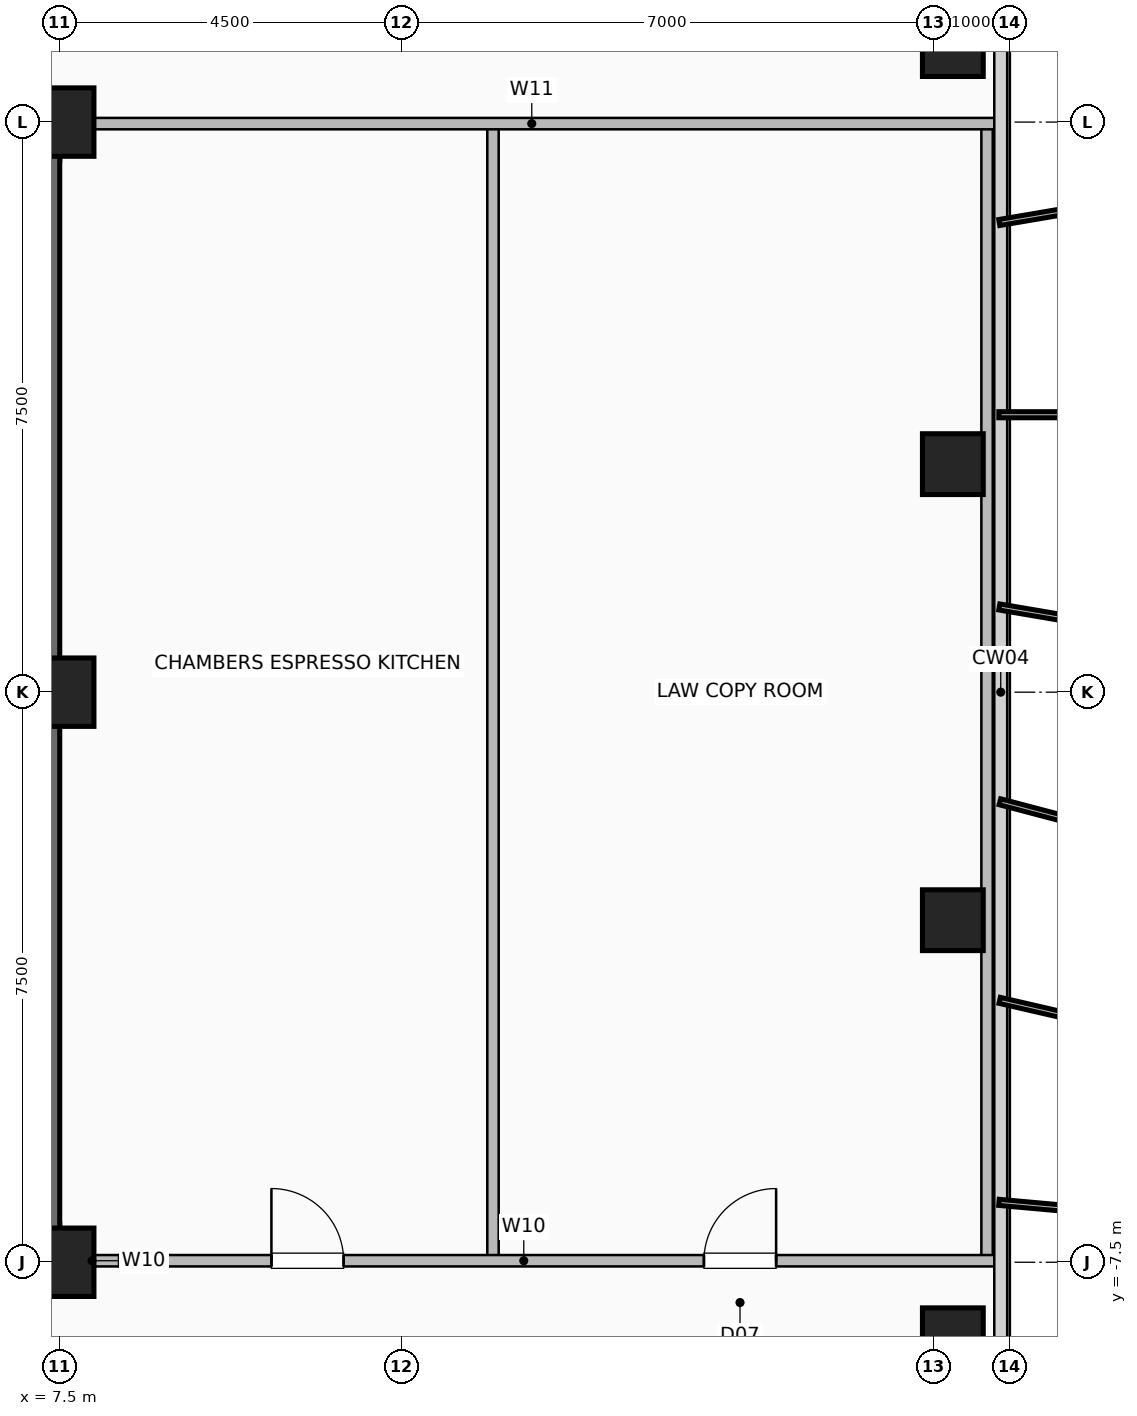
"""IFC4 building model, lengths in metres.
Left out: names, types, materials, properties, quantities, classifications, styles, units other than length and angle.
Written with IfcOpenShell. Run it as: python <this file> out.ifc"""

import sys

from ifc_helpers import new_model, si_unit, direction, frame, frame_2d, origin, origin_2d, place, context, subcontext, project, spatial, rectangle, hollow_rectangle, extrude, element, fill, save


model = new_model("IFC4")
c1 = context("Model", 3, precision=1e-05, world=origin(), true_north=direction((0.0, 1.0)))
c2 = subcontext(c1, "Body", "Model", "MODEL_VIEW")
j1 = project(units=[si_unit("LENGTHUNIT", "METRE"), si_unit("PLANEANGLEUNIT", "RADIAN")], contexts=[c1])
p1 = place(None, origin())
s1 = spatial("IfcSite", under=j1, at=p1, CompositionType="ELEMENT")
p2 = place(p1, origin())
s2 = spatial("IfcBuilding", under=s1, at=p2, CompositionType="ELEMENT")
p3 = place(p2, frame((0.0, 0.0, 173.4)))
s3 = spatial("IfcBuildingStorey", under=s2, at=p3, CompositionType="ELEMENT", Elevation=173.4)
for number, where, z_axis, x_axis in (
    (1, (7.5, -7.5, 0.0), (0.0, 0.0, 1.0), (1.0, 0.0, 0.0)),
    (2, (7.5, 0.0, 0.0), (0.0, 0.0, 1.0), (1.0, 0.0, 0.0)),
    (3, (7.5, 7.5, 0.0), (0.0, 0.0, 1.0), (1.0, 0.0, 0.0)),
):
    element("IfcColumn", number, at=place(p3, frame(where, z_axis=z_axis, x_axis=x_axis)), inside=s3, PredefinedType="COLUMN", context=c2, shape_type="SweptSolid", body=[
        extrude(hollow_rectangle(XDim=0.9, YDim=0.9, WallThickness=0.045, at=origin_2d()), origin(), (0.0, 0.0, 1.0), 3.6),
    ])
for number, where, z_axis, x_axis in (
    (4, (19.25, -8.5, 0.0), (0.0, 0.0, 1.0), (1.0, 0.0, 0.0)),
    (5, (19.25, -3.0, 0.0), (0.0, 0.0, 1.0), (1.0, 0.0, 0.0)),
    (6, (19.25, 3.0, 0.0), (0.0, 0.0, 1.0), (1.0, 0.0, 0.0)),
    (7, (19.25, 8.5, 0.0), (0.0, 0.0, 1.0), (1.0, 0.0, 0.0)),
):
    element("IfcColumn", number, at=place(p3, frame(where, z_axis=z_axis, x_axis=x_axis)), inside=s3, PredefinedType="COLUMN", context=c2, shape_type="SweptSolid", body=[
        extrude(hollow_rectangle(XDim=0.8, YDim=0.8, WallThickness=0.04, at=origin_2d()), origin(), (0.0, 0.0, 1.0), 3.6),
    ])
p4 = place(p3, frame((-7.5, -7.25, 0.0), z_axis=(0.0, 0.0, 1.0), x_axis=(1.0, 0.0, 0.0)))
e8 = element("IfcWall", 8, at=p4, inside=s3, PredefinedType="SHEAR", context=c2, shape_type="SweptSolid", body=[
    extrude(rectangle(XDim=15.0, YDim=0.5, at=frame_2d((7.5, 0.0))), origin(), (0.0, 0.0, 1.0), 3.36),
])
p5 = place(p4, frame((1.55, 0.0, 0.0)))
e9 = element("IfcOpeningElement", 9, at=p5, cuts=e8, PredefinedType="OPENING", context=c2, shape_type="SweptSolid", body=[
    extrude(rectangle(XDim=1.05, YDim=2.08, at=frame_2d((0.525, 1.04))), frame((0.0, 0.26, 0.0), z_axis=(0.0, -1.0, 0.0), x_axis=(1.0, 0.0, 0.0)), (0.0, 0.0, 1.0), 0.52),
])
p6 = place(p4, frame((12.4, 0.0, 0.0)))
e10 = element("IfcOpeningElement", 10, at=p6, cuts=e8, PredefinedType="OPENING", context=c2, shape_type="SweptSolid", body=[
    extrude(rectangle(XDim=1.05, YDim=2.08, at=frame_2d((0.525, 1.04))), frame((0.0, 0.26, 0.0), z_axis=(0.0, -1.0, 0.0), x_axis=(1.0, 0.0, 0.0)), (0.0, 0.0, 1.0), 0.52),
])
p7 = place(p4, frame((5.2, 0.0, 0.0)))
e11 = element("IfcOpeningElement", 11, at=p7, cuts=e8, PredefinedType="OPENING", context=c2, shape_type="SweptSolid", body=[
    extrude(rectangle(XDim=1.0, YDim=2.08, at=frame_2d((0.5, 1.04))), frame((0.0, 0.26, 0.0), z_axis=(0.0, -1.0, 0.0), x_axis=(1.0, 0.0, 0.0)), (0.0, 0.0, 1.0), 0.52),
])
p8 = place(p4, frame((8.65, 0.0, 0.0)))
e12 = element("IfcOpeningElement", 12, at=p8, cuts=e8, PredefinedType="OPENING", context=c2, shape_type="SweptSolid", body=[
    extrude(rectangle(XDim=1.0, YDim=2.08, at=frame_2d((0.5, 1.04))), frame((0.0, 0.26, 0.0), z_axis=(0.0, -1.0, 0.0), x_axis=(1.0, 0.0, 0.0)), (0.0, 0.0, 1.0), 0.52),
])
for number, where, z_axis, x_axis in (
    (13, (-7.5, 7.25, 0.0), (0.0, 0.0, 1.0), (1.0, 0.0, 0.0)),
    (14, (7.25, -7.5, 0.0), (0.0, 0.0, 1.0), (0.0, 1.0, 0.0)),
):
    element("IfcWall", number, at=place(p3, frame(where, z_axis=z_axis, x_axis=x_axis)), inside=s3, PredefinedType="SHEAR", context=c2, shape_type="SweptSolid", body=[
        extrude(rectangle(XDim=15.0, YDim=0.5, at=frame_2d((7.5, 0.0))), origin(), (0.0, 0.0, 1.0), 3.36),
    ])
p9 = place(p3, frame((7.45, -7.48, 0.0), z_axis=(0.0, 0.0, 1.0), x_axis=(1.0, 0.0, 0.0)))
e15 = element("IfcWall", 15, at=p9, inside=s3, PredefinedType="PARTITIONING", context=c2, shape_type="SweptSolid", body=[
    extrude(rectangle(XDim=0.95, YDim=0.15, at=frame_2d((0.475, 0.0))), origin(), (0.0, 0.0, 1.0), 3.36),
])
for number, where, z_axis, x_axis in (
    (16, (13.2, -7.48, 0.0), (0.0, 0.0, 1.0), (0.0, 1.0, 0.0)),
    (17, (19.7, -7.48, 0.0), (0.0, 0.0, 1.0), (0.0, 1.0, 0.0)),
):
    element("IfcWall", number, at=place(p3, frame(where, z_axis=z_axis, x_axis=x_axis)), inside=s3, PredefinedType="PARTITIONING", context=c2, shape_type="SweptSolid", body=[
        extrude(rectangle(XDim=14.9, YDim=0.15, at=frame_2d((7.45, 0.0))), origin(), (0.0, 0.0, 1.0), 3.36),
    ])
p10 = place(p3, frame((8.28, -7.48, 0.0), z_axis=(0.0, 0.0, 1.0), x_axis=(1.0, 0.0, 0.0)))
e18 = element("IfcWall", 18, at=p10, inside=s3, PredefinedType="PARTITIONING", context=c2, shape_type="SweptSolid", body=[
    extrude(rectangle(XDim=11.54, YDim=0.15, at=frame_2d((5.77, 0.0))), origin(), (0.0, 0.0, 1.0), 3.36),
])
p11 = place(p10, frame((2.005, 0.0, 0.0)))
e19 = element("IfcOpeningElement", 19, at=p11, cuts=e18, PredefinedType="OPENING", context=c2, shape_type="SweptSolid", body=[
    extrude(rectangle(XDim=0.95, YDim=2.06, at=frame_2d((0.475, 1.03))), frame((0.0, 0.085, 0.0), z_axis=(0.0, -1.0, 0.0), x_axis=(1.0, 0.0, 0.0)), (0.0, 0.0, 1.0), 0.17),
])
p12 = place(p10, frame((7.695, 0.0, 0.0)))
e20 = element("IfcOpeningElement", 20, at=p12, cuts=e18, PredefinedType="OPENING", context=c2, shape_type="SweptSolid", body=[
    extrude(rectangle(XDim=0.95, YDim=2.06, at=frame_2d((0.475, 1.03))), frame((0.0, 0.085, 0.0), z_axis=(0.0, -1.0, 0.0), x_axis=(1.0, 0.0, 0.0)), (0.0, 0.0, 1.0), 0.17),
])
p13 = place(p3, frame((7.6, 7.48, 0.0), z_axis=(0.0, 0.0, 1.0), x_axis=(1.0, 0.0, 0.0)))
e21 = element("IfcWall", 21, at=p13, inside=s3, PredefinedType="PARTITIONING", context=c2, shape_type="SweptSolid", body=[
    extrude(rectangle(XDim=12.22, YDim=0.15, at=frame_2d((6.11, 0.0))), origin(), (0.0, 0.0, 1.0), 3.36),
])
p14 = place(p11, origin())
e22 = element("IfcDoor", 22, at=p14, inside=s3, OperationType="SINGLE_SWING_LEFT", PredefinedType="DOOR", context=c2, shape_type="SweptSolid", body=[
    extrude(rectangle(XDim=0.95, YDim=2.06, at=frame_2d((0.475, 1.03))), frame((0.0, 0.025, 0.0), z_axis=(0.0, -1.0, 0.0), x_axis=(1.0, 0.0, 0.0)), (0.0, 0.0, 1.0), 0.05),
])
fill(e19, e22)
p15 = place(p12, origin())
e23 = element("IfcDoor", 23, at=p15, inside=s3, OperationType="SINGLE_SWING_RIGHT", PredefinedType="DOOR", context=c2, shape_type="SweptSolid", body=[
    extrude(rectangle(XDim=0.95, YDim=2.06, at=frame_2d((0.475, 1.03))), frame((0.0, 0.025, 0.0), z_axis=(0.0, -1.0, 0.0), x_axis=(1.0, 0.0, 0.0)), (0.0, 0.0, 1.0), 0.05),
])
fill(e20, e23)
save(model, sys.argv[1])
